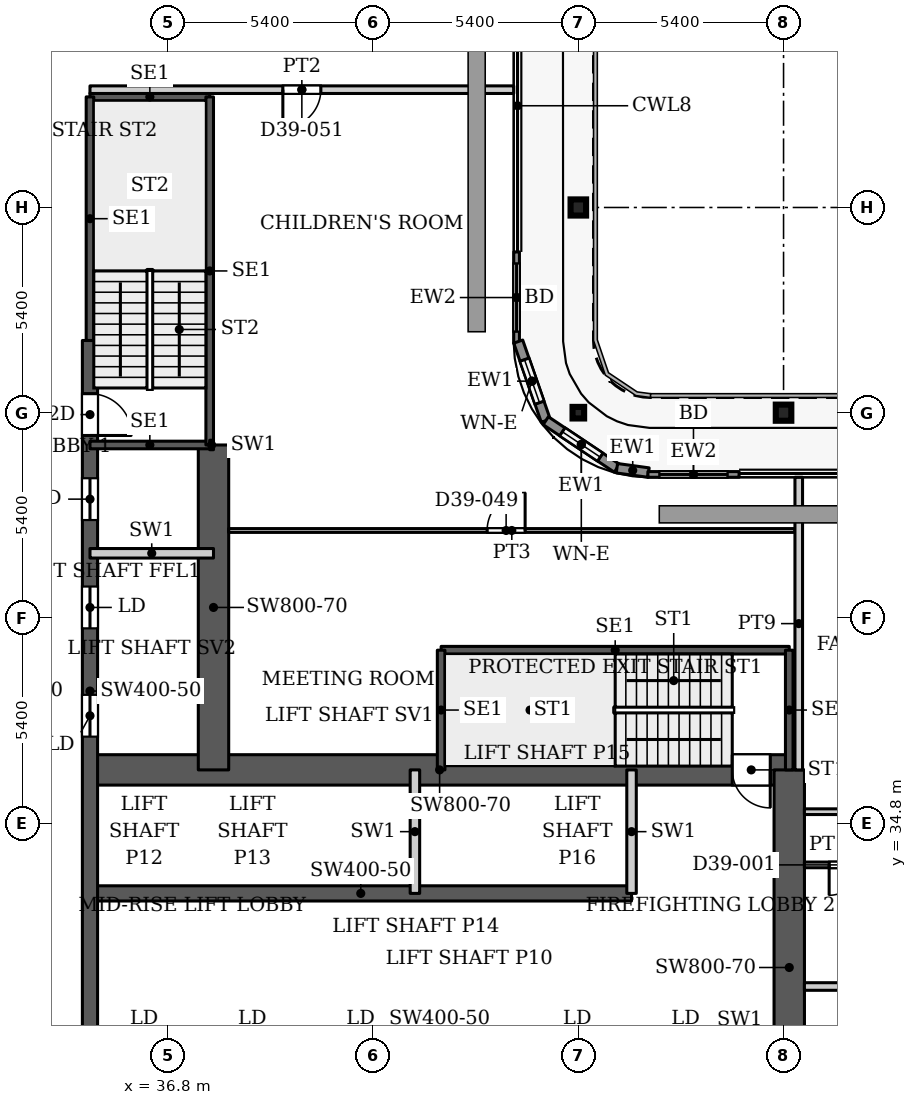
"""IFC4 building model, lengths in metres.
Left out: names, types, materials, properties, quantities, classifications, styles, units other than length and angle.
Written with IfcOpenShell. Run it as: python <this file> out.ifc"""

import sys

from ifc_helpers import new_model, si_unit, direction, frame, frame_2d, origin, origin_2d, place, context, subcontext, project, spatial, rectangle, hollow_rectangle, i_section, extrude, source, transform, mapped, element, fill, save


model = new_model("IFC4")
c1 = context("Model", 3, precision=1e-05, world=origin(), true_north=direction((0.0, 1.0)))
c2 = subcontext(c1, "Body", "Model", "MODEL_VIEW")
j1 = project(units=[si_unit("LENGTHUNIT", "METRE"), si_unit("PLANEANGLEUNIT", "RADIAN")], contexts=[c1])
p1 = place(None, origin())
s1 = spatial("IfcSite", under=j1, at=p1, CompositionType="ELEMENT")
p2 = place(p1, origin())
s2 = spatial("IfcBuilding", under=s1, at=p2, CompositionType="ELEMENT")
p3 = place(p2, frame((0.0, 0.0, 168.2)))
s3 = spatial("IfcBuildingStorey", under=s2, at=p3, CompositionType="ELEMENT", Elevation=168.2)
for number, where, z_axis, x_axis in (
    (1, (53.0, 45.6, 0.0), (0.0, 0.0, 1.0), (1.0, 0.0, 0.0)),
    (2, (47.6, 51.0, 0.0), (0.0, 0.0, 1.0), (1.0, 0.0, 0.0)),
):
    element("IfcColumn", number, at=place(p3, frame(where, z_axis=z_axis, x_axis=x_axis)), inside=s3, PredefinedType="COLUMN", context=c2, shape_type="SweptSolid", body=[
        extrude(i_section(OverallWidth=0.409, OverallDepth=0.425, WebThickness=0.033, FlangeThickness=0.052, FilletRadius=0.013, at=origin_2d()), origin(), (0.0, 0.0, 1.0), 3.9),
    ])
p4 = place(p3, frame((47.6, 45.6, 0.0), z_axis=(0.0, 0.0, 1.0), x_axis=(1.0, 0.0, 0.0)))
e3 = element("IfcColumn", 3, at=p4, inside=s3, PredefinedType="COLUMN", context=c2, shape_type="SweptSolid", body=[
    extrude(hollow_rectangle(XDim=0.305, YDim=0.305, WallThickness=0.016, InnerFilletRadius=0.016, OuterFilletRadius=0.032, at=origin_2d()), origin(), (0.0, 0.0, 1.0), 3.9),
])
p5 = place(p3, frame((34.75, 32.95, 0.0), z_axis=(0.0, 0.0, 1.0), x_axis=(1.0, 0.0, 0.0)))
e4 = element("IfcWall", 4, at=p5, inside=s3, PredefinedType="SHEAR", context=c2, shape_type="SweptSolid", body=[
    extrude(rectangle(XDim=14.25, YDim=0.4, at=frame_2d((7.125, 0.0))), origin(), (0.0, 0.0, 1.0), 3.9),
])
p6 = place(p3, frame((34.75, 36.2, 0.0), z_axis=(0.0, 0.0, 1.0), x_axis=(1.0, 0.0, 0.0)))
e5 = element("IfcWall", 5, at=p6, inside=s3, PredefinedType="SHEAR", context=c2, shape_type="SweptSolid", body=[
    extrude(rectangle(XDim=18.4, YDim=0.8, at=frame_2d((9.2, 0.0))), origin(), (0.0, 0.0, 1.0), 3.9),
])
p7 = place(p6, frame((16.9, 0.0, 0.0)))
e6 = element("IfcOpeningElement", 6, at=p7, cuts=e5, PredefinedType="OPENING", context=c2, shape_type="SweptSolid", body=[
    extrude(rectangle(XDim=1.0, YDim=2.2, at=frame_2d((0.5, 1.1))), frame((0.0, 0.41, 0.0), z_axis=(0.0, -1.0, 0.0), x_axis=(1.0, 0.0, 0.0)), (0.0, 0.0, 1.0), 0.82),
])
p8 = place(p3, frame((34.75, 29.05, 0.0), z_axis=(0.0, 0.0, 1.0), x_axis=(0.0, 1.0, 0.0)))
e7 = element("IfcWall", 7, at=p8, inside=s3, PredefinedType="SHEAR", context=c2, shape_type="SweptSolid", body=[
    extrude(rectangle(XDim=18.45, YDim=0.4, at=frame_2d((9.225, 0.0))), origin(), (0.0, 0.0, 1.0), 3.9),
])
p9 = place(p8, frame((8.025, 0.0, 0.0)))
e8 = element("IfcOpeningElement", 8, at=p9, cuts=e7, PredefinedType="OPENING", context=c2, shape_type="SweptSolid", body=[
    extrude(rectangle(XDim=1.1, YDim=2.2, at=frame_2d((0.55, 1.1))), frame((0.0, 0.21, 0.0), z_axis=(0.0, -1.0, 0.0), x_axis=(1.0, 0.0, 0.0)), (0.0, 0.0, 1.0), 0.42),
])
p10 = place(p8, frame((10.875, 0.0, 0.0)))
e9 = element("IfcOpeningElement", 9, at=p10, cuts=e7, PredefinedType="OPENING", context=c2, shape_type="SweptSolid", body=[
    extrude(rectangle(XDim=1.1, YDim=2.2, at=frame_2d((0.55, 1.1))), frame((0.0, 0.21, 0.0), z_axis=(0.0, -1.0, 0.0), x_axis=(1.0, 0.0, 0.0)), (0.0, 0.0, 1.0), 0.42),
])
p11 = place(p8, frame((13.725, 0.0, 0.0)))
e10 = element("IfcOpeningElement", 10, at=p11, cuts=e7, PredefinedType="OPENING", context=c2, shape_type="SweptSolid", body=[
    extrude(rectangle(XDim=1.1, YDim=2.2, at=frame_2d((0.55, 1.1))), frame((0.0, 0.21, 0.0), z_axis=(0.0, -1.0, 0.0), x_axis=(1.0, 0.0, 0.0)), (0.0, 0.0, 1.0), 0.42),
])
p12 = place(p8, frame((15.95, 0.0, 0.0)))
e11 = element("IfcOpeningElement", 11, at=p12, cuts=e7, PredefinedType="OPENING", context=c2, shape_type="SweptSolid", body=[
    extrude(rectangle(XDim=1.1, YDim=2.2, at=frame_2d((0.55, 1.1))), frame((0.0, 0.21, 0.0), z_axis=(0.0, -1.0, 0.0), x_axis=(1.0, 0.0, 0.0)), (0.0, 0.0, 1.0), 0.42),
])
p13 = place(p3, frame((38.0, 36.2, 0.0), z_axis=(0.0, 0.0, 1.0), x_axis=(0.0, 1.0, 0.0)))
e12 = element("IfcWall", 12, at=p13, inside=s3, PredefinedType="SHEAR", context=c2, shape_type="SweptSolid", body=[
    extrude(rectangle(XDim=8.55, YDim=0.8, at=frame_2d((4.275, 0.0))), origin(), (0.0, 0.0, 1.0), 3.9),
])
p14 = place(p3, frame((53.15, 25.8, 0.0), z_axis=(0.0, 0.0, 1.0), x_axis=(0.0, 1.0, 0.0)))
e13 = element("IfcWall", 13, at=p14, inside=s3, PredefinedType="SHEAR", context=c2, shape_type="SweptSolid", body=[
    extrude(rectangle(XDim=10.4, YDim=0.8, at=frame_2d((5.2, 0.0))), origin(), (0.0, 0.0, 1.0), 3.9),
])
p15 = place(p3, frame((45.975, 49.83, 0.0), z_axis=(0.0, 0.0, 1.0), x_axis=(0.0, -1.0, 0.0)))
e14 = element("IfcWall", 14, at=p15, inside=s3, PredefinedType="SOLIDWALL", context=c2, shape_type="SweptSolid", body=[
    extrude(rectangle(XDim=2.4, YDim=0.15, at=frame_2d((1.2, 0.0))), origin(), (0.0, 0.0, 1.0), 3.75),
])
p16 = place(p15, frame((0.3, 0.0, 0.0)))
e15 = element("IfcOpeningElement", 15, at=p16, cuts=e14, PredefinedType="OPENING", context=c2, shape_type="SweptSolid", body=[
    extrude(rectangle(XDim=1.8, YDim=2.4, at=frame_2d((0.9, 1.2))), frame((0.0, 0.085, 0.0), z_axis=(0.0, -1.0, 0.0), x_axis=(1.0, 0.0, 0.0)), (0.0, 0.0, 1.0), 0.17),
])
p17 = place(p3, frame((46.018, 47.471, 0.0), z_axis=(0.0, 0.0, 1.0), x_axis=(0.328791208903, -0.944402637093, 0.0)))
e16 = element("IfcWall", 16, at=p17, inside=s3, PredefinedType="SOLIDWALL", context=c2, shape_type="SweptSolid", body=[
    extrude(rectangle(XDim=2.205, YDim=0.25, at=frame_2d((1.102, 0.0))), origin(), (0.0, 0.0, 1.0), 3.75),
])
p18 = place(p17, frame((0.503, 0.0, 0.6)))
e17 = element("IfcOpeningElement", 17, at=p18, cuts=e16, PredefinedType="OPENING", context=c2, shape_type="SweptSolid", body=[
    extrude(rectangle(XDim=1.2, YDim=2.1, at=frame_2d((0.6, 1.05))), frame((0.0, 0.135, 0.0), z_axis=(0.0, -1.0, 0.0), x_axis=(1.0, 0.0, 0.0)), (0.0, 0.0, 1.0), 0.27),
])
p19 = place(p3, frame((46.743, 45.389, 0.0), z_axis=(0.0, 0.0, 1.0), x_axis=(0.831449265529, -0.555600682912, 0.0)))
e18 = element("IfcWall", 18, at=p19, inside=s3, PredefinedType="SOLIDWALL", context=c2, shape_type="SweptSolid", body=[
    extrude(rectangle(XDim=2.251, YDim=0.25, at=frame_2d((1.126, 0.0))), origin(), (0.0, 0.0, 1.0), 3.75),
])
p20 = place(p19, frame((0.525, 0.0, 0.6)))
e19 = element("IfcOpeningElement", 19, at=p20, cuts=e18, PredefinedType="OPENING", context=c2, shape_type="SweptSolid", body=[
    extrude(rectangle(XDim=1.2, YDim=2.1, at=frame_2d((0.6, 1.05))), frame((0.0, 0.135, 0.0), z_axis=(0.0, -1.0, 0.0), x_axis=(1.0, 0.0, 0.0)), (0.0, 0.0, 1.0), 0.27),
])
p21 = place(p3, frame((48.615, 44.138, 0.0), z_axis=(0.0, 0.0, 1.0), x_axis=(0.990741504246, -0.135761819977, 0.0)))
e20 = element("IfcWall", 20, at=p21, inside=s3, PredefinedType="SOLIDWALL", context=c2, shape_type="SweptSolid", body=[
    extrude(rectangle(XDim=0.84, YDim=0.25, at=frame_2d((0.42, 0.0))), origin(), (0.0, 0.0, 1.0), 3.75),
])
p22 = place(p3, frame((49.43, 43.975, 0.0), z_axis=(0.0, 0.0, 1.0), x_axis=(1.0, 0.0, 0.0)))
e21 = element("IfcWall", 21, at=p22, inside=s3, PredefinedType="SOLIDWALL", context=c2, shape_type="SweptSolid", body=[
    extrude(rectangle(XDim=2.4, YDim=0.15, at=frame_2d((1.2, 0.0))), origin(), (0.0, 0.0, 1.0), 3.75),
])
p23 = place(p22, frame((0.3, 0.0, 0.0)))
e22 = element("IfcOpeningElement", 22, at=p23, cuts=e21, PredefinedType="OPENING", context=c2, shape_type="SweptSolid", body=[
    extrude(rectangle(XDim=1.8, YDim=2.4, at=frame_2d((0.9, 1.2))), frame((0.0, 0.085, 0.0), z_axis=(0.0, -1.0, 0.0), x_axis=(1.0, 0.0, 0.0)), (0.0, 0.0, 1.0), 0.17),
])
p24 = place(p3, frame((43.99, 39.35, 0.0), z_axis=(0.0, 0.0, 1.0), x_axis=(1.0, 0.0, 0.0)))
e23 = element("IfcWall", 23, at=p24, inside=s3, PredefinedType="SHEAR", context=c2, shape_type="SweptSolid", body=[
    extrude(rectangle(XDim=9.16, YDim=0.2, at=frame_2d((4.58, 0.0))), origin(), (0.0, 0.0, 1.0), 3.9),
])
for number, where, z_axis, x_axis in (
    (24, (43.99, 36.2, 0.0), (0.0, 0.0, 1.0), (0.0, 1.0, 0.0)),
    (25, (53.15, 36.2, 0.0), (0.0, 0.0, 1.0), (0.0, 1.0, 0.0)),
):
    element("IfcWall", number, at=place(p3, frame(where, z_axis=z_axis, x_axis=x_axis)), inside=s3, PredefinedType="SHEAR", context=c2, shape_type="SweptSolid", body=[
        extrude(rectangle(XDim=3.15, YDim=0.2, at=frame_2d((1.575, 0.0))), origin(), (0.0, 0.0, 1.0), 3.9),
    ])
for number, where, z_axis, x_axis in (
    (26, (34.75, 44.75, 0.0), (0.0, 0.0, 1.0), (1.0, 0.0, 0.0)),
    (27, (34.75, 53.91, 0.0), (0.0, 0.0, 1.0), (1.0, 0.0, 0.0)),
):
    element("IfcWall", number, at=place(p3, frame(where, z_axis=z_axis, x_axis=x_axis)), inside=s3, PredefinedType="SHEAR", context=c2, shape_type="SweptSolid", body=[
        extrude(rectangle(XDim=3.15, YDim=0.2, at=frame_2d((1.575, 0.0))), origin(), (0.0, 0.0, 1.0), 3.9),
    ])
p25 = place(p3, frame((34.75, 47.5, 0.0), z_axis=(0.0, 0.0, 1.0), x_axis=(0.0, 1.0, 0.0)))
e28 = element("IfcWall", 28, at=p25, inside=s3, PredefinedType="SHEAR", context=c2, shape_type="SweptSolid", body=[
    extrude(rectangle(XDim=6.41, YDim=0.2, at=frame_2d((3.205, 0.0))), origin(), (0.0, 0.0, 1.0), 3.9),
])
p26 = place(p3, frame((37.9, 44.75, 0.0), z_axis=(0.0, 0.0, 1.0), x_axis=(0.0, 1.0, 0.0)))
e29 = element("IfcWall", 29, at=p26, inside=s3, PredefinedType="SHEAR", context=c2, shape_type="SweptSolid", body=[
    extrude(rectangle(XDim=9.16, YDim=0.2, at=frame_2d((4.58, 0.0))), origin(), (0.0, 0.0, 1.0), 3.9),
])
for number, where, z_axis, x_axis in (
    (30, (43.3, 32.95, 0.0), (0.0, 0.0, 1.0), (0.0, 1.0, 0.0)),
    (31, (49.0, 32.95, 0.0), (0.0, 0.0, 1.0), (0.0, 1.0, 0.0)),
    (32, (34.75, 41.9, 0.0), (0.0, 0.0, 1.0), (1.0, 0.0, 0.0)),
):
    element("IfcWall", number, at=place(p3, frame(where, z_axis=z_axis, x_axis=x_axis)), inside=s3, PredefinedType="PARTITIONING", context=c2, shape_type="SweptSolid", body=[
        extrude(rectangle(XDim=3.25, YDim=0.25, at=frame_2d((1.625, 0.0))), origin(), (0.0, 0.0, 1.0), 3.9),
    ])
p27 = place(p3, frame((37.9, 44.75, 0.0), z_axis=(0.0, 0.0, 1.0), x_axis=(1.0, 0.0, 0.0)))
e33 = element("IfcWall", 33, at=p27, inside=s3, PredefinedType="PARTITIONING", context=c2, shape_type="SweptSolid", body=[
    extrude(rectangle(XDim=0.1, YDim=0.25, at=frame_2d((0.05, 0.0))), origin(), (0.0, 0.0, 1.0), 3.9),
])
p28 = place(p3, frame((34.75, 54.1, 0.0), z_axis=(0.0, 0.0, 1.0), x_axis=(1.0, 0.0, 0.0)))
e34 = element("IfcWall", 34, at=p28, inside=s3, PredefinedType="PARTITIONING", context=c2, shape_type="SweptSolid", body=[
    extrude(rectangle(XDim=11.15, YDim=0.2, at=frame_2d((5.575, 0.0))), origin(), (0.0, 0.0, 1.0), 3.6),
])
p29 = place(p28, frame((5.075, 0.0, 0.0)))
e35 = element("IfcOpeningElement", 35, at=p29, cuts=e34, PredefinedType="OPENING", context=c2, shape_type="SweptSolid", body=[
    extrude(rectangle(XDim=1.0, YDim=2.1, at=frame_2d((0.5, 1.05))), frame((0.0, 0.11, 0.0), z_axis=(0.0, -1.0, 0.0), x_axis=(1.0, 0.0, 0.0)), (0.0, 0.0, 1.0), 0.22),
])
p30 = place(p3, frame((38.399, 42.5, 0.0), z_axis=(0.0, 0.0, 1.0), x_axis=(1.0, 0.0, 0.0)))
e36 = element("IfcWall", 36, at=p30, inside=s3, PredefinedType="PARTITIONING", context=c2, shape_type="SweptSolid", body=[
    extrude(rectangle(XDim=14.901, YDim=0.1, at=frame_2d((7.451, 0.0))), origin(), (0.0, 0.0, 1.0), 3.6),
])
p31 = place(p30, frame((6.801, 0.0, 0.0)))
e37 = element("IfcOpeningElement", 37, at=p31, cuts=e36, PredefinedType="OPENING", context=c2, shape_type="SweptSolid", body=[
    extrude(rectangle(XDim=1.0, YDim=2.1, at=frame_2d((0.5, 1.05))), frame((0.0, 0.06, 0.0), z_axis=(0.0, -1.0, 0.0), x_axis=(1.0, 0.0, 0.0)), (0.0, 0.0, 1.0), 0.12),
])
p32 = place(p3, frame((53.4, 36.199, 0.0), z_axis=(0.0, 0.0, 1.0), x_axis=(0.0, 1.0, 0.0)))
e38 = element("IfcWall", 38, at=p32, inside=s3, PredefinedType="PARTITIONING", context=c2, shape_type="SweptSolid", body=[
    extrude(rectangle(XDim=7.701, YDim=0.2, at=frame_2d((3.851, 0.0))), origin(), (0.0, 0.0, 1.0), 3.6),
])
p33 = place(p3, frame((53.549, 30.5, 0.0), z_axis=(0.0, 0.0, 1.0), x_axis=(1.0, 0.0, 0.0)))
e39 = element("IfcWall", 39, at=p33, inside=s3, PredefinedType="PARTITIONING", context=c2, shape_type="SweptSolid", body=[
    extrude(rectangle(XDim=39.151, YDim=0.2, at=frame_2d((19.575, 0.0))), origin(), (0.0, 0.0, 1.0), 3.6),
])
p34 = place(p33, frame((2.801, 0.0, 0.0)))
e40 = element("IfcOpeningElement", 40, at=p34, cuts=e39, PredefinedType="OPENING", context=c2, shape_type="SweptSolid", body=[
    extrude(rectangle(XDim=1.0, YDim=2.1, at=frame_2d((0.5, 1.05))), frame((0.0, 0.11, 0.0), z_axis=(0.0, -1.0, 0.0), x_axis=(1.0, 0.0, 0.0)), (0.0, 0.0, 1.0), 0.22),
])
p35 = place(p33, frame((9.851, 0.0, 0.0)))
e41 = element("IfcOpeningElement", 41, at=p35, cuts=e39, PredefinedType="OPENING", context=c2, shape_type="SweptSolid", body=[
    extrude(rectangle(XDim=1.0, YDim=2.1, at=frame_2d((0.5, 1.05))), frame((0.0, 0.11, 0.0), z_axis=(0.0, -1.0, 0.0), x_axis=(1.0, 0.0, 0.0)), (0.0, 0.0, 1.0), 0.22),
])
p36 = place(p33, frame((28.751, 0.0, 0.0)))
e42 = element("IfcOpeningElement", 42, at=p36, cuts=e39, PredefinedType="OPENING", context=c2, shape_type="SweptSolid", body=[
    extrude(rectangle(XDim=1.0, YDim=2.1, at=frame_2d((0.5, 1.05))), frame((0.0, 0.11, 0.0), z_axis=(0.0, -1.0, 0.0), x_axis=(1.0, 0.0, 0.0)), (0.0, 0.0, 1.0), 0.22),
])
p37 = place(p33, frame((32.651, 0.0, 0.0)))
e43 = element("IfcOpeningElement", 43, at=p37, cuts=e39, PredefinedType="OPENING", context=c2, shape_type="SweptSolid", body=[
    extrude(rectangle(XDim=1.0, YDim=2.1, at=frame_2d((0.5, 1.05))), frame((0.0, 0.11, 0.0), z_axis=(0.0, -1.0, 0.0), x_axis=(1.0, 0.0, 0.0)), (0.0, 0.0, 1.0), 0.22),
])
p38 = place(p3, frame((53.549, 33.7, 0.0), z_axis=(0.0, 0.0, 1.0), x_axis=(1.0, 0.0, 0.0)))
e44 = element("IfcWall", 44, at=p38, inside=s3, PredefinedType="PARTITIONING", context=c2, shape_type="SweptSolid", body=[
    extrude(rectangle(XDim=2.176, YDim=0.15, at=frame_2d((1.088, 0.0))), origin(), (0.0, 0.0, 1.0), 3.6),
])
p39 = place(p38, frame((0.651, 0.0, 0.0)))
e45 = element("IfcOpeningElement", 45, at=p39, cuts=e44, PredefinedType="OPENING", context=c2, shape_type="SweptSolid", body=[
    extrude(rectangle(XDim=0.8, YDim=2.1, at=frame_2d((0.4, 1.05))), frame((0.0, 0.085, 0.0), z_axis=(0.0, -1.0, 0.0), x_axis=(1.0, 0.0, 0.0)), (0.0, 0.0, 1.0), 0.17),
])
p40 = place(p3, frame((53.549, 35.1, 0.0), z_axis=(0.0, 0.0, 1.0), x_axis=(1.0, 0.0, 0.0)))
e46 = element("IfcWall", 46, at=p40, inside=s3, PredefinedType="PARTITIONING", context=c2, shape_type="SweptSolid", body=[
    extrude(rectangle(XDim=9.351, YDim=0.15, at=frame_2d((4.675, 0.0))), origin(), (0.0, 0.0, 1.0), 3.6),
])
p41 = place(p40, frame((7.351, 0.0, 0.0)))
e47 = element("IfcOpeningElement", 47, at=p41, cuts=e46, PredefinedType="OPENING", context=c2, shape_type="SweptSolid", body=[
    extrude(rectangle(XDim=0.9, YDim=2.1, at=frame_2d((0.45, 1.05))), frame((0.0, 0.085, 0.0), z_axis=(0.0, -1.0, 0.0), x_axis=(1.0, 0.0, 0.0)), (0.0, 0.0, 1.0), 0.17),
])
p42 = place(p40, frame((2.501, 0.0, 0.0)))
e48 = element("IfcOpeningElement", 48, at=p42, cuts=e46, PredefinedType="OPENING", context=c2, shape_type="SweptSolid", body=[
    extrude(rectangle(XDim=1.0, YDim=2.1, at=frame_2d((0.5, 1.05))), frame((0.0, 0.085, 0.0), z_axis=(0.0, -1.0, 0.0), x_axis=(1.0, 0.0, 0.0)), (0.0, 0.0, 1.0), 0.17),
])
m1 = source(origin(), c2, "Body", "SweptSolid", [
    extrude(rectangle(XDim=1.8, YDim=2.4, at=frame_2d((0.9, 1.2))), frame((0.0, 0.025, 0.0), z_axis=(0.0, -1.0, 0.0), x_axis=(1.0, 0.0, 0.0)), (0.0, 0.0, 1.0), 0.05),
])
p43 = place(p16, origin())
e49 = element("IfcDoor", 49, at=p43, inside=s3, OperationType="SLIDING_TO_LEFT", PredefinedType="DOOR", context=c2, shape_type="MappedRepresentation", body=[
    mapped(m1, transform((0.0, 0.0, 0.0), x_axis=(1.0, 0.0, 0.0), y_axis=(0.0, 1.0, 0.0), z_axis=(0.0, 0.0, 1.0), scale=1.0)),
])
fill(e15, e49)
m2 = source(origin(), c2, "Body", "SweptSolid", [
    extrude(rectangle(XDim=1.2, YDim=2.1, at=frame_2d((0.6, 1.05))), frame((0.0, 0.03, 0.0), z_axis=(0.0, -1.0, 0.0), x_axis=(1.0, 0.0, 0.0)), (0.0, 0.0, 1.0), 0.06),
])
p44 = place(p18, origin())
e50 = element("IfcWindow", 50, at=p44, inside=s3, PartitioningType="SINGLE_PANEL", PredefinedType="WINDOW", context=c2, shape_type="MappedRepresentation", body=[
    mapped(m2, transform((0.0, 0.0, 0.0), x_axis=(1.0, 0.0, 0.0), y_axis=(0.0, 1.0, 0.0), z_axis=(0.0, 0.0, 1.0), scale=1.0)),
])
fill(e17, e50)
p45 = place(p20, origin())
e51 = element("IfcWindow", 51, at=p45, inside=s3, PartitioningType="SINGLE_PANEL", PredefinedType="WINDOW", context=c2, shape_type="MappedRepresentation", body=[
    mapped(m2, transform((0.0, 0.0, 0.0), x_axis=(1.0, 0.0, 0.0), y_axis=(0.0, 1.0, 0.0), z_axis=(0.0, 0.0, 1.0), scale=1.0)),
])
fill(e19, e51)
p46 = place(p23, origin())
e52 = element("IfcDoor", 52, at=p46, inside=s3, OperationType="SLIDING_TO_LEFT", PredefinedType="DOOR", context=c2, shape_type="MappedRepresentation", body=[
    mapped(m1, transform((0.0, 0.0, 0.0), x_axis=(1.0, 0.0, 0.0), y_axis=(0.0, 1.0, 0.0), z_axis=(0.0, 0.0, 1.0), scale=1.0)),
])
fill(e22, e52)
m3 = source(origin(), c2, "Body", "SweptSolid", [
    extrude(rectangle(XDim=1.1, YDim=2.2, at=frame_2d((0.55, 1.1))), frame((0.0, 0.025, 0.0), z_axis=(0.0, -1.0, 0.0), x_axis=(1.0, 0.0, 0.0)), (0.0, 0.0, 1.0), 0.05),
])
p47 = place(p9, origin())
e53 = element("IfcDoor", 53, at=p47, inside=s3, OperationType="SLIDING_TO_LEFT", PredefinedType="DOOR", context=c2, shape_type="MappedRepresentation", body=[
    mapped(m3, transform((0.0, 0.0, 0.0), x_axis=(1.0, 0.0, 0.0), y_axis=(0.0, 1.0, 0.0), z_axis=(0.0, 0.0, 1.0), scale=1.0)),
])
fill(e8, e53)
p48 = place(p10, origin())
e54 = element("IfcDoor", 54, at=p48, inside=s3, OperationType="SLIDING_TO_LEFT", PredefinedType="DOOR", context=c2, shape_type="MappedRepresentation", body=[
    mapped(m3, transform((0.0, 0.0, 0.0), x_axis=(1.0, 0.0, 0.0), y_axis=(0.0, 1.0, 0.0), z_axis=(0.0, 0.0, 1.0), scale=1.0)),
])
fill(e9, e54)
p49 = place(p11, origin())
e55 = element("IfcDoor", 55, at=p49, inside=s3, OperationType="SLIDING_TO_LEFT", PredefinedType="DOOR", context=c2, shape_type="MappedRepresentation", body=[
    mapped(m3, transform((0.0, 0.0, 0.0), x_axis=(1.0, 0.0, 0.0), y_axis=(0.0, 1.0, 0.0), z_axis=(0.0, 0.0, 1.0), scale=1.0)),
])
fill(e10, e55)
m4 = source(origin(), c2, "Body", "SweptSolid", [
    extrude(rectangle(XDim=1.0, YDim=2.2, at=frame_2d((0.5, 1.1))), frame((0.0, 0.025, 0.0), z_axis=(0.0, -1.0, 0.0), x_axis=(1.0, 0.0, 0.0)), (0.0, 0.0, 1.0), 0.05),
])
p50 = place(p7, origin())
e56 = element("IfcDoor", 56, at=p50, inside=s3, OperationType="SINGLE_SWING_RIGHT", PredefinedType="DOOR", context=c2, shape_type="MappedRepresentation", body=[
    mapped(m4, transform((0.0, 0.0, 0.0), x_axis=(1.0, 0.0, 0.0), y_axis=(0.0, 1.0, 0.0), z_axis=(0.0, 0.0, 1.0), scale=1.0)),
])
fill(e6, e56)
m5 = source(origin(), c2, "Body", "SweptSolid", [
    extrude(rectangle(XDim=1.1, YDim=2.2, at=frame_2d((0.55, 1.1))), frame((0.0, 0.025, 0.0), z_axis=(0.0, -1.0, 0.0), x_axis=(1.0, 0.0, 0.0)), (0.0, 0.0, 1.0), 0.05),
])
p51 = place(p12, origin())
e57 = element("IfcDoor", 57, at=p51, inside=s3, OperationType="SINGLE_SWING_RIGHT", PredefinedType="DOOR", context=c2, shape_type="MappedRepresentation", body=[
    mapped(m5, transform((0.0, 0.0, 0.0), x_axis=(1.0, 0.0, 0.0), y_axis=(0.0, 1.0, 0.0), z_axis=(0.0, 0.0, 1.0), scale=1.0)),
])
fill(e11, e57)
m6 = source(origin(), c2, "Body", "SweptSolid", [
    extrude(rectangle(XDim=0.8, YDim=2.1, at=frame_2d((0.4, 1.05))), frame((0.0, 0.025, 0.0), z_axis=(0.0, -1.0, 0.0), x_axis=(1.0, 0.0, 0.0)), (0.0, 0.0, 1.0), 0.05),
])
p52 = place(p39, origin())
e58 = element("IfcDoor", 58, at=p52, inside=s3, OperationType="SINGLE_SWING_RIGHT", PredefinedType="DOOR", context=c2, shape_type="MappedRepresentation", body=[
    mapped(m6, transform((0.0, 0.0, 0.0), x_axis=(1.0, 0.0, 0.0), y_axis=(0.0, 1.0, 0.0), z_axis=(0.0, 0.0, 1.0), scale=1.0)),
])
fill(e45, e58)
m7 = source(origin(), c2, "Body", "SweptSolid", [
    extrude(rectangle(XDim=1.0, YDim=2.1, at=frame_2d((0.5, 1.05))), frame((0.0, 0.025, 0.0), z_axis=(0.0, -1.0, 0.0), x_axis=(1.0, 0.0, 0.0)), (0.0, 0.0, 1.0), 0.05),
])
p53 = place(p31, origin())
e59 = element("IfcDoor", 59, at=p53, inside=s3, OperationType="SINGLE_SWING_LEFT", PredefinedType="DOOR", context=c2, shape_type="MappedRepresentation", body=[
    mapped(m7, transform((0.0, 0.0, 0.0), x_axis=(1.0, 0.0, 0.0), y_axis=(0.0, 1.0, 0.0), z_axis=(0.0, 0.0, 1.0), scale=1.0)),
])
fill(e37, e59)
m8 = source(origin(), c2, "Body", "SweptSolid", [
    extrude(rectangle(XDim=1.0, YDim=2.1, at=frame_2d((0.5, 1.05))), frame((0.0, 0.025, 0.0), z_axis=(0.0, -1.0, 0.0), x_axis=(1.0, 0.0, 0.0)), (0.0, 0.0, 1.0), 0.05),
])
p54 = place(p29, origin())
e60 = element("IfcDoor", 60, at=p54, inside=s3, OperationType="SINGLE_SWING_RIGHT", PredefinedType="DOOR", context=c2, shape_type="MappedRepresentation", body=[
    mapped(m8, transform((0.0, 0.0, 0.0), x_axis=(1.0, 0.0, 0.0), y_axis=(0.0, 1.0, 0.0), z_axis=(0.0, 0.0, 1.0), scale=1.0)),
])
fill(e35, e60)
save(model, sys.argv[1])
